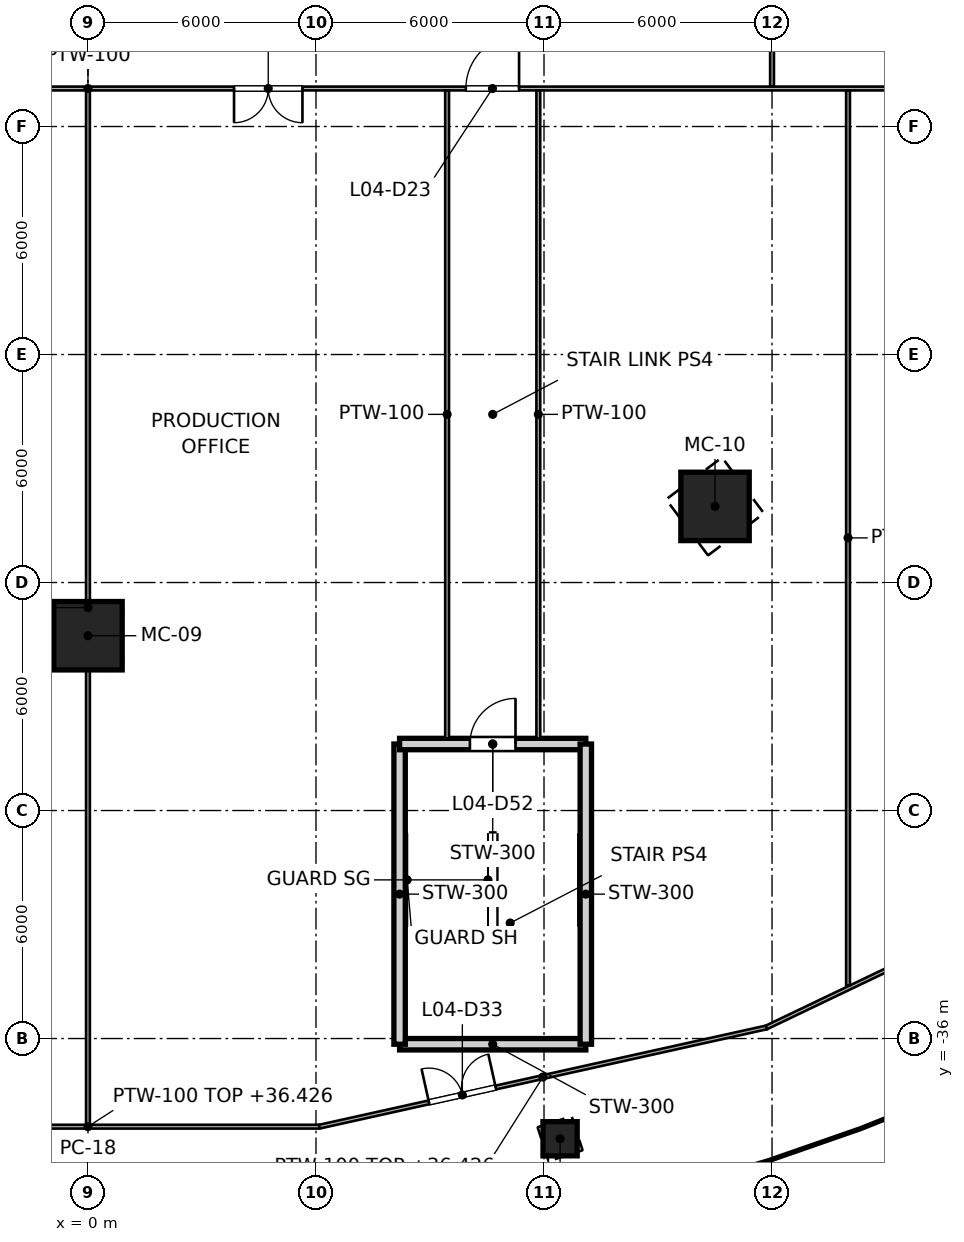
"""IFC4 building model, lengths in metres.
Left out: names, types, materials, properties, quantities, classifications, styles, units other than length and angle.
Written with IfcOpenShell. Run it as: python <this file> out.ifc"""

import sys

from ifc_helpers import new_model, si_unit, direction, frame, frame_2d, origin, origin_2d, place, context, subcontext, project, spatial, rectangle, hollow_rectangle, extrude, element, fill, save


model = new_model("IFC4")
c1 = context("Model", 3, precision=1e-05, world=origin(), true_north=direction((0.0, 1.0)))
c2 = subcontext(c1, "Body", "Model", "MODEL_VIEW")
j1 = project(units=[si_unit("LENGTHUNIT", "METRE"), si_unit("PLANEANGLEUNIT", "RADIAN")], contexts=[c1])
p1 = place(None, origin())
s1 = spatial("IfcSite", under=j1, at=p1, CompositionType="ELEMENT")
p2 = place(p1, origin())
s2 = spatial("IfcBuilding", under=s1, at=p2, CompositionType="ELEMENT")
p3 = place(p2, frame((0.0, 0.0, 31.4)))
s3 = spatial("IfcBuildingStorey", under=s2, at=p3, CompositionType="ELEMENT", Elevation=31.4)
for number, where, z_axis, x_axis in (
    (1, (0.0, -25.4, 0.0), (0.0, 0.0, 1.0), (0.0, -1.0, 0.0)),
    (2, (16.5, -21.997, 0.0), (0.0, 0.0, 1.0), (0.6, -0.8, 0.0)),
):
    element("IfcColumn", number, at=place(p3, frame(where, z_axis=z_axis, x_axis=x_axis)), inside=s3, PredefinedType="COLUMN", context=c2, shape_type="SweptSolid", body=[
        extrude(hollow_rectangle(XDim=1.8, YDim=1.8, WallThickness=0.08, at=origin_2d()), origin(), (0.0, 0.0, 1.0), 6.0),
    ])
p4 = place(p3, frame((12.423, -38.637, 0.0), z_axis=(0.0, 0.0, 1.0), x_axis=(0.306104074477, -0.951998054404, 0.0)))
e3 = element("IfcColumn", 3, at=p4, inside=s3, PredefinedType="COLUMN", context=c2, shape_type="SweptSolid", body=[
    extrude(hollow_rectangle(XDim=0.9, YDim=0.9, WallThickness=0.04, at=origin_2d()), origin(), (0.0, 0.0, 1.0), 6.0),
])
p5 = place(p3, frame((13.1, -36.15, 0.0), z_axis=(0.0, 0.0, 1.0), x_axis=(-1.0, 0.0, 0.0)))
e4 = element("IfcWall", 4, at=p5, inside=s3, PredefinedType="SOLIDWALL", context=c2, shape_type="SweptSolid", body=[
    extrude(rectangle(XDim=4.9, YDim=0.3, at=frame_2d((2.45, 0.0))), origin(), (0.0, 0.0, 1.0), 5.8),
])
p6 = place(p3, frame((8.2, -36.15, 0.0), z_axis=(0.0, 0.0, 1.0), x_axis=(0.0, 1.0, 0.0)))
e5 = element("IfcWall", 5, at=p6, inside=s3, PredefinedType="SOLIDWALL", context=c2, shape_type="SweptSolid", body=[
    extrude(rectangle(XDim=7.9, YDim=0.3, at=frame_2d((3.95, 0.0))), origin(), (0.0, 0.0, 1.0), 5.8),
])
p7 = place(p3, frame((8.2, -28.25, 0.0), z_axis=(0.0, 0.0, 1.0), x_axis=(1.0, 0.0, 0.0)))
e6 = element("IfcWall", 6, at=p7, inside=s3, PredefinedType="SOLIDWALL", context=c2, shape_type="SweptSolid", body=[
    extrude(rectangle(XDim=4.9, YDim=0.3, at=frame_2d((2.45, 0.0))), origin(), (0.0, 0.0, 1.0), 5.8),
])
p8 = place(p7, frame((1.85, 0.0, 0.0)))
e7 = element("IfcOpeningElement", 7, at=p8, cuts=e6, PredefinedType="OPENING", context=c2, shape_type="SweptSolid", body=[
    extrude(rectangle(XDim=1.2, YDim=2.1, at=frame_2d((0.6, 1.05))), frame((0.0, 0.15, 0.0), z_axis=(0.0, -1.0, 0.0), x_axis=(1.0, 0.0, 0.0)), (0.0, 0.0, 1.0), 0.3),
])
p9 = place(p3, frame((13.1, -28.25, 0.0), z_axis=(0.0, 0.0, 1.0), x_axis=(0.0, -1.0, 0.0)))
e8 = element("IfcWall", 8, at=p9, inside=s3, PredefinedType="SOLIDWALL", context=c2, shape_type="SweptSolid", body=[
    extrude(rectangle(XDim=7.9, YDim=0.3, at=frame_2d((3.95, 0.0))), origin(), (0.0, 0.0, 1.0), 5.8),
])
p10 = place(p3, frame((-6.089, -38.319, 0.0), z_axis=(0.0, 0.0, 1.0), x_axis=(1.0, 0.0, 0.0)))
e9 = element("IfcWall", 9, at=p10, inside=s3, PredefinedType="PARTITIONING", context=c2, shape_type="SweptSolid", body=[
    extrude(rectangle(XDim=12.178, YDim=0.1, at=frame_2d((6.089, 0.0))), origin(), (0.0, 0.0, 1.0), 5.026),
])
p11 = place(p3, frame((6.089, -38.319, 0.0), z_axis=(0.0, 0.0, 1.0), x_axis=(0.97623471049, 0.216715920124, 0.0)))
e10 = element("IfcWall", 10, at=p11, inside=s3, PredefinedType="PARTITIONING", context=c2, shape_type="SweptSolid", body=[
    extrude(rectangle(XDim=12.05, YDim=0.1, at=frame_2d((6.025, 0.0))), origin(), (0.0, 0.0, 1.0), 5.026),
])
p12 = place(p11, frame((2.954, 0.0, 0.0)))
e11 = element("IfcOpeningElement", 11, at=p12, cuts=e10, PredefinedType="OPENING", context=c2, shape_type="SweptSolid", body=[
    extrude(rectangle(XDim=1.8, YDim=2.1, at=frame_2d((0.9, 1.05))), frame((0.0, 0.05, 0.0), z_axis=(0.0, -1.0, 0.0), x_axis=(1.0, 0.0, 0.0)), (0.0, 0.0, 1.0), 0.1),
])
p13 = place(p3, frame((17.852, -35.708, 0.0), z_axis=(0.0, 0.0, 1.0), x_axis=(0.902100999032, 0.431524955878, 0.0)))
e12 = element("IfcWall", 12, at=p13, inside=s3, PredefinedType="PARTITIONING", context=c2, shape_type="SweptSolid", body=[
    extrude(rectangle(XDim=11.691, YDim=0.1, at=frame_2d((5.845, 0.0))), origin(), (0.0, 0.0, 1.0), 5.026),
])
p14 = place(p13, frame((6.838, 0.0, 0.0)))
e13 = element("IfcOpeningElement", 13, at=p14, cuts=e12, PredefinedType="OPENING", context=c2, shape_type="SweptSolid", body=[
    extrude(rectangle(XDim=0.9, YDim=2.1, at=frame_2d((0.45, 1.05))), frame((0.0, 0.05, 0.0), z_axis=(0.0, -1.0, 0.0), x_axis=(1.0, 0.0, 0.0)), (0.0, 0.0, 1.0), 0.1),
])
p15 = place(p3, frame((-44.256, -11.0, 0.0), z_axis=(0.0, 0.0, 1.0), x_axis=(1.0, 0.0, 0.0)))
e14 = element("IfcWall", 14, at=p15, inside=s3, PredefinedType="PARTITIONING", context=c2, shape_type="SweptSolid", body=[
    extrude(rectangle(XDim=88.512, YDim=0.1, at=frame_2d((44.256, 0.0))), origin(), (0.0, 0.0, 1.0), 4.868),
])
p16 = place(p15, frame((32.9, 0.0, 0.0)))
e15 = element("IfcOpeningElement", 15, at=p16, cuts=e14, PredefinedType="OPENING", context=c2, shape_type="SweptSolid", body=[
    extrude(rectangle(XDim=1.4, YDim=2.1, at=frame_2d((0.7, 1.05))), frame((0.0, 0.05, 0.0), z_axis=(0.0, -1.0, 0.0), x_axis=(1.0, 0.0, 0.0)), (0.0, 0.0, 1.0), 0.1),
])
p17 = place(p15, frame((54.2, 0.0, 0.0)))
e16 = element("IfcOpeningElement", 16, at=p17, cuts=e14, PredefinedType="OPENING", context=c2, shape_type="SweptSolid", body=[
    extrude(rectangle(XDim=1.4, YDim=2.1, at=frame_2d((0.7, 1.05))), frame((0.0, 0.05, 0.0), z_axis=(0.0, -1.0, 0.0), x_axis=(1.0, 0.0, 0.0)), (0.0, 0.0, 1.0), 0.1),
])
p18 = place(p15, frame((38.65, 0.0, 0.0)))
e17 = element("IfcOpeningElement", 17, at=p18, cuts=e14, PredefinedType="OPENING", context=c2, shape_type="SweptSolid", body=[
    extrude(rectangle(XDim=1.8, YDim=2.1, at=frame_2d((0.9, 1.05))), frame((0.0, 0.05, 0.0), z_axis=(0.0, -1.0, 0.0), x_axis=(1.0, 0.0, 0.0)), (0.0, 0.0, 1.0), 0.1),
])
p19 = place(p15, frame((48.1, 0.0, 0.0)))
e18 = element("IfcOpeningElement", 18, at=p19, cuts=e14, PredefinedType="OPENING", context=c2, shape_type="SweptSolid", body=[
    extrude(rectangle(XDim=1.8, YDim=2.1, at=frame_2d((0.9, 1.05))), frame((0.0, 0.05, 0.0), z_axis=(0.0, -1.0, 0.0), x_axis=(1.0, 0.0, 0.0)), (0.0, 0.0, 1.0), 0.1),
])
p20 = place(p3, frame((18.0, -10.95, 0.0), z_axis=(0.0, 0.0, 1.0), x_axis=(0.0, 1.0, 0.0)))
e19 = element("IfcWall", 19, at=p20, inside=s3, PredefinedType="PARTITIONING", context=c2, shape_type="SweptSolid", body=[
    extrude(rectangle(XDim=21.9, YDim=0.1, at=frame_2d((10.95, 0.0))), origin(), (0.0, 0.0, 1.0), 4.877),
])
p21 = place(p20, frame((10.25, 0.0, 0.0)))
e20 = element("IfcOpeningElement", 20, at=p21, cuts=e19, PredefinedType="OPENING", context=c2, shape_type="SweptSolid", body=[
    extrude(rectangle(XDim=1.4, YDim=2.1, at=frame_2d((0.7, 1.05))), frame((0.0, 0.05, 0.0), z_axis=(0.0, -1.0, 0.0), x_axis=(1.0, 0.0, 0.0)), (0.0, 0.0, 1.0), 0.1),
])
p22 = place(p20, frame((2.05, 0.0, 0.0)))
e21 = element("IfcOpeningElement", 21, at=p22, cuts=e19, PredefinedType="OPENING", context=c2, shape_type="SweptSolid", body=[
    extrude(rectangle(XDim=1.8, YDim=2.1, at=frame_2d((0.9, 1.05))), frame((0.0, 0.05, 0.0), z_axis=(0.0, -1.0, 0.0), x_axis=(1.0, 0.0, 0.0)), (0.0, 0.0, 1.0), 0.1),
])
p23 = place(p20, frame((7.0, 0.0, 0.0)))
e22 = element("IfcOpeningElement", 22, at=p23, cuts=e19, PredefinedType="OPENING", context=c2, shape_type="SweptSolid", body=[
    extrude(rectangle(XDim=0.9, YDim=2.1, at=frame_2d((0.45, 1.05))), frame((0.0, 0.05, 0.0), z_axis=(0.0, -1.0, 0.0), x_axis=(1.0, 0.0, 0.0)), (0.0, 0.0, 1.0), 0.1),
])
p24 = place(p20, frame((14.45, 0.0, 0.0)))
e23 = element("IfcOpeningElement", 23, at=p24, cuts=e19, PredefinedType="OPENING", context=c2, shape_type="SweptSolid", body=[
    extrude(rectangle(XDim=0.9, YDim=2.1, at=frame_2d((0.45, 1.05))), frame((0.0, 0.05, 0.0), z_axis=(0.0, -1.0, 0.0), x_axis=(1.0, 0.0, 0.0)), (0.0, 0.0, 1.0), 0.1),
])
p25 = place(p20, frame((18.95, 0.0, 0.0)))
e24 = element("IfcOpeningElement", 24, at=p25, cuts=e19, PredefinedType="OPENING", context=c2, shape_type="SweptSolid", body=[
    extrude(rectangle(XDim=0.9, YDim=2.1, at=frame_2d((0.45, 1.05))), frame((0.0, 0.05, 0.0), z_axis=(0.0, -1.0, 0.0), x_axis=(1.0, 0.0, 0.0)), (0.0, 0.0, 1.0), 0.1),
])
p26 = place(p3, frame((0.0, -11.05, 0.0), z_axis=(0.0, 0.0, 1.0), x_axis=(0.0, -1.0, 0.0)))
e25 = element("IfcWall", 25, at=p26, inside=s3, PredefinedType="PARTITIONING", context=c2, shape_type="SweptSolid", body=[
    extrude(rectangle(XDim=27.219, YDim=0.1, at=frame_2d((13.61, 0.0))), origin(), (0.0, 0.0, 1.0), 4.945),
])
p27 = place(p3, frame((20.0, -11.05, 0.0), z_axis=(0.0, 0.0, 1.0), x_axis=(0.0, -1.0, 0.0)))
e26 = element("IfcWall", 26, at=p27, inside=s3, PredefinedType="PARTITIONING", context=c2, shape_type="SweptSolid", body=[
    extrude(rectangle(XDim=23.551, YDim=0.1, at=frame_2d((11.776, 0.0))), origin(), (0.0, 0.0, 1.0), 4.868),
])
for number, where, z_axis, x_axis in (
    (27, (9.45, -11.05, 0.0), (0.0, 0.0, 1.0), (0.0, -1.0, 0.0)),
    (28, (11.85, -11.05, 0.0), (0.0, 0.0, 1.0), (0.0, -1.0, 0.0)),
):
    element("IfcWall", number, at=place(p3, frame(where, z_axis=z_axis, x_axis=x_axis)), inside=s3, PredefinedType="PARTITIONING", context=c2, shape_type="SweptSolid", body=[
        extrude(rectangle(XDim=17.05, YDim=0.1, at=frame_2d((8.525, 0.0))), origin(), (0.0, 0.0, 1.0), 4.868),
    ])
p28 = place(p17, origin())
e29 = element("IfcDoor", 29, at=p28, inside=s3, OperationType="SINGLE_SWING_RIGHT", PredefinedType="DOOR", context=c2, shape_type="SweptSolid", body=[
    extrude(rectangle(XDim=1.4, YDim=2.1, at=frame_2d((0.7, 1.05))), frame((0.0, 0.025, 0.0), z_axis=(0.0, -1.0, 0.0), x_axis=(1.0, 0.0, 0.0)), (0.0, 0.0, 1.0), 0.05),
])
fill(e16, e29)
p29 = place(p19, origin())
e30 = element("IfcDoor", 30, at=p29, inside=s3, OperationType="DOUBLE_DOOR_SINGLE_SWING", PredefinedType="DOOR", context=c2, shape_type="SweptSolid", body=[
    extrude(rectangle(XDim=1.8, YDim=2.1, at=frame_2d((0.9, 1.05))), frame((0.0, 0.025, 0.0), z_axis=(0.0, -1.0, 0.0), x_axis=(1.0, 0.0, 0.0)), (0.0, 0.0, 1.0), 0.05),
])
fill(e18, e30)
p30 = place(p12, origin())
e31 = element("IfcDoor", 31, at=p30, inside=s3, OperationType="DOUBLE_DOOR_SINGLE_SWING", PredefinedType="DOOR", context=c2, shape_type="SweptSolid", body=[
    extrude(rectangle(XDim=1.8, YDim=2.1, at=frame_2d((0.9, 1.05))), frame((0.0, 0.025, 0.0), z_axis=(0.0, -1.0, 0.0), x_axis=(1.0, 0.0, 0.0)), (0.0, 0.0, 1.0), 0.05),
])
fill(e11, e31)
p31 = place(p8, origin())
e32 = element("IfcDoor", 32, at=p31, inside=s3, OperationType="SINGLE_SWING_RIGHT", PredefinedType="DOOR", context=c2, shape_type="SweptSolid", body=[
    extrude(rectangle(XDim=1.2, YDim=2.1, at=frame_2d((0.6, 1.05))), frame((0.0, 0.025, 0.0), z_axis=(0.0, -1.0, 0.0), x_axis=(1.0, 0.0, 0.0)), (0.0, 0.0, 1.0), 0.05),
])
fill(e7, e32)
save(model, sys.argv[1])
